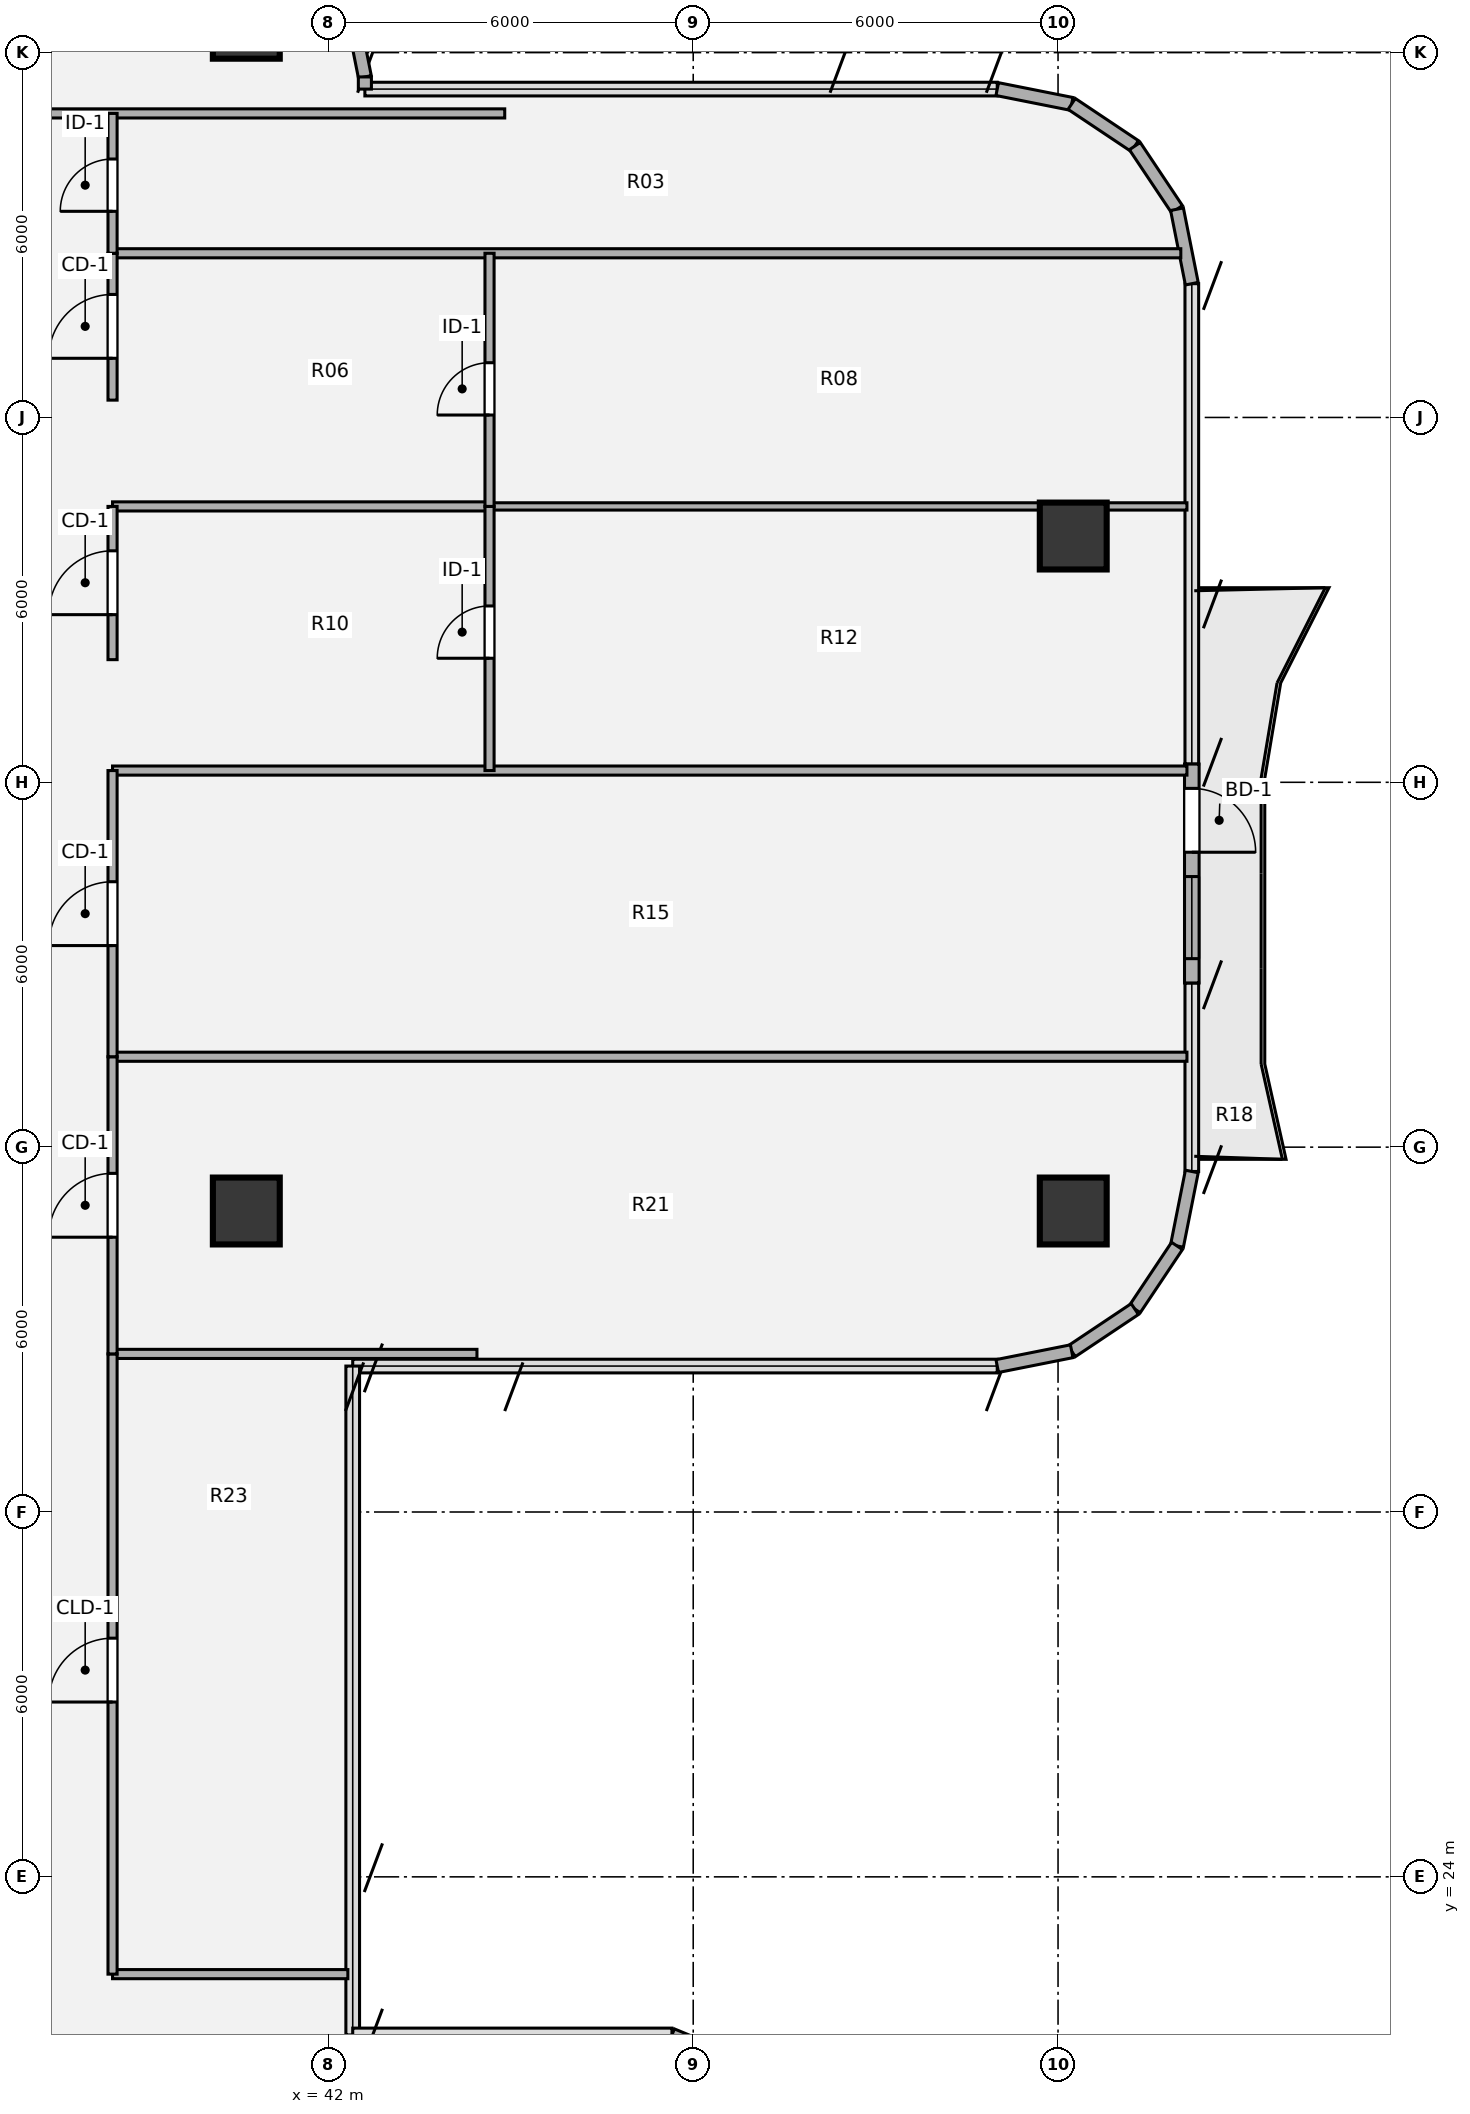
"""IFC4 building model, lengths in metres.
Left out: names, types, materials, properties, quantities, classifications, styles, units other than length and angle.
Written with IfcOpenShell. Run it as: python <this file> out.ifc"""

import sys

from ifc_helpers import new_model, si_unit, direction, frame, frame_2d, origin, origin_2d, place, context, subcontext, project, spatial, rectangle, hollow_circle, extrude, source, transform, mapped, element, fill, save


model = new_model("IFC4")
c1 = context("Model", 3, precision=1e-05, world=origin(), true_north=direction((0.0, 1.0)))
c2 = subcontext(c1, "Body", "Model", "MODEL_VIEW")
j1 = project(units=[si_unit("LENGTHUNIT", "METRE"), si_unit("PLANEANGLEUNIT", "RADIAN")], contexts=[c1])
p1 = place(None, origin())
s1 = spatial("IfcSite", under=j1, at=p1, CompositionType="ELEMENT")
p2 = place(p1, origin())
s2 = spatial("IfcBuilding", under=s1, at=p2, CompositionType="ELEMENT")
p3 = place(p2, frame((0.0, 0.0, 201.78)))
s3 = spatial("IfcBuildingStorey", under=s2, at=p3, CompositionType="ELEMENT", Elevation=201.78)
m1 = source(origin(), c2, "Body", "SweptSolid", [
    extrude(hollow_circle(Radius=0.55, WallThickness=0.04, at=origin_2d()), origin(), (0.0, 0.0, 1.0), 3.78),
])
for number, where, z_axis, x_axis in (
    (1, (54.25, 34.95, 0.0), (0.0, 0.0, 1.0), (1.0, 0.0, 0.0)),
    (2, (54.25, 46.05, 0.0), (0.0, 0.0, 1.0), (1.0, 0.0, 0.0)),
    (3, (40.65, 34.95, 0.0), (0.0, 0.0, 1.0), (1.0, 0.0, 0.0)),
    (4, (40.65, 54.45, 0.0), (0.0, 0.0, 1.0), (1.0, 0.0, 0.0)),
):
    element("IfcColumn", number, at=place(p3, frame(where, z_axis=z_axis, x_axis=x_axis)), inside=s3, PredefinedType="COLUMN", context=c2, shape_type="MappedRepresentation", body=[
        mapped(m1, transform((0.0, 0.0, 0.0), x_axis=(1.0, 0.0, 0.0), y_axis=(0.0, 1.0, 0.0), z_axis=(0.0, 0.0, 1.0), scale=1.0)),
    ])
p4 = place(p3, frame((42.387, 54.671, 0.0), z_axis=(0.0, 0.0, 1.0), x_axis=(0.195127417394, -0.980777900945, 0.0)))
e5 = element("IfcWall", 5, at=p4, inside=s3, PredefinedType="SOLIDWALL", context=c2, shape_type="SweptSolid", body=[
    extrude(rectangle(XDim=1.092, YDim=0.215, at=frame_2d((0.546, 0.0))), origin(), (0.0, 0.0, 1.0), 3.53),
])
p5 = place(p3, frame((42.6, 53.6, 0.0), z_axis=(0.0, 0.0, 1.0), x_axis=(0.0, -1.0, 0.0)))
e6 = element("IfcWall", 6, at=p5, inside=s3, PredefinedType="SOLIDWALL", context=c2, shape_type="SweptSolid", body=[
    extrude(rectangle(XDim=0.2, YDim=0.215, at=frame_2d((0.1, 0.0))), origin(), (0.0, 0.0, 1.0), 3.53),
])
for number, where, z_axis, x_axis in (
    (7, (53.0, 53.4, 0.0), (0.0, 0.0, 1.0), (0.981, -0.195, 0.0)),
    (8, (54.225, 53.156, 0.0), (0.0, 0.0, 1.0), (0.831, -0.556, 0.0)),
    (9, (55.263, 52.463, 0.0), (0.0, 0.0, 1.0), (0.556, -0.831, 0.0)),
    (10, (55.956, 51.425, 0.0), (0.0, 0.0, 1.0), (0.195, -0.981, 0.0)),
):
    element("IfcWall", number, at=place(p3, frame(where, z_axis=z_axis, x_axis=x_axis)), inside=s3, PredefinedType="SOLIDWALL", context=c2, shape_type="SweptSolid", body=[
        extrude(rectangle(XDim=1.249, YDim=0.215, at=frame_2d((0.624, 0.0))), origin(), (0.0, 0.0, 1.0), 3.53),
    ])
p6 = place(p3, frame((56.2, 42.3, 0.0), z_axis=(0.0, 0.0, 1.0), x_axis=(0.0, -1.0, 0.0)))
e11 = element("IfcWall", 11, at=p6, inside=s3, PredefinedType="SOLIDWALL", context=c2, shape_type="SweptSolid", body=[
    extrude(rectangle(XDim=3.6, YDim=0.24, at=frame_2d((1.8, 0.0))), origin(), (0.0, 0.0, 1.0), 3.53),
])
p7 = place(p6, frame((0.4, 0.0, 0.0)))
e12 = element("IfcOpeningElement", 12, at=p7, cuts=e11, PredefinedType="OPENING", context=c2, shape_type="SweptSolid", body=[
    extrude(rectangle(XDim=1.05, YDim=2.15, at=origin_2d()), frame((0.525, 0.13, 1.075), z_axis=(0.0, -1.0, 0.0), x_axis=(1.0, 0.0, 0.0)), (0.0, 0.0, 1.0), 0.26),
])
p8 = place(p6, frame((1.85, 0.0, 0.85)))
e13 = element("IfcOpeningElement", 13, at=p8, cuts=e11, PredefinedType="OPENING", context=c2, shape_type="SweptSolid", body=[
    extrude(rectangle(XDim=1.35, YDim=1.35, at=origin_2d()), frame((0.675, 0.13, 0.675), z_axis=(0.0, -1.0, 0.0), x_axis=(1.0, 0.0, 0.0)), (0.0, 0.0, 1.0), 0.26),
])
for number, where, z_axis, x_axis in (
    (14, (56.2, 35.6, 0.0), (0.0, 0.0, 1.0), (-0.195, -0.981, 0.0)),
    (15, (55.956, 34.375, 0.0), (0.0, 0.0, 1.0), (-0.556, -0.831, 0.0)),
    (16, (55.263, 33.337, 0.0), (0.0, 0.0, 1.0), (-0.831, -0.556, 0.0)),
    (17, (54.225, 32.644, 0.0), (0.0, 0.0, 1.0), (-0.981, -0.195, 0.0)),
):
    element("IfcWall", number, at=place(p3, frame(where, z_axis=z_axis, x_axis=x_axis)), inside=s3, PredefinedType="SOLIDWALL", context=c2, shape_type="SweptSolid", body=[
        extrude(rectangle(XDim=1.249, YDim=0.215, at=frame_2d((0.624, 0.0))), origin(), (0.0, 0.0, 1.0), 3.53),
    ])
p9 = place(p3, frame((47.65, 21.4, 0.0), z_axis=(0.0, 0.0, 1.0), x_axis=(0.924205486139, -0.381895560841, 0.0)))
e18 = element("IfcWall", 18, at=p9, inside=s3, PredefinedType="SOLIDWALL", context=c2, shape_type="SweptSolid", body=[
    extrude(rectangle(XDim=0.268, YDim=0.215, at=frame_2d((0.134, 0.0))), origin(), (0.0, 0.0, 1.0), 3.53),
])
p10 = place(p3, frame((38.45, 22.4, 0.0), z_axis=(0.0, 0.0, 1.0), x_axis=(1.0, 0.0, 0.0)))
e19 = element("IfcWall", 19, at=p10, inside=s3, PredefinedType="PARTITIONING", context=c2, shape_type="SweptSolid", body=[
    extrude(rectangle(XDim=3.87, YDim=0.15, at=frame_2d((1.935, 0.0))), origin(), (0.0, 0.0, 1.0), 3.5),
])
p11 = place(p3, frame((38.45, 32.6, 0.0), z_axis=(0.0, 0.0, 1.0), x_axis=(1.0, 0.0, 0.0)))
e20 = element("IfcWall", 20, at=p11, inside=s3, PredefinedType="PARTITIONING", context=c2, shape_type="SweptSolid", body=[
    extrude(rectangle(XDim=5.993, YDim=0.15, at=frame_2d((2.997, 0.0))), origin(), (0.0, 0.0, 1.0), 3.5),
])
p12 = place(p3, frame((38.45, 37.487, 0.0), z_axis=(0.0, 0.0, 1.0), x_axis=(1.0, 0.0, 0.0)))
e21 = element("IfcWall", 21, at=p12, inside=s3, PredefinedType="PARTITIONING", context=c2, shape_type="SweptSolid", body=[
    extrude(rectangle(XDim=17.67, YDim=0.15, at=frame_2d((8.835, 0.0))), origin(), (0.0, 0.0, 1.0), 3.055),
])
p13 = place(p3, frame((38.45, 42.193, 0.0), z_axis=(0.0, 0.0, 1.0), x_axis=(1.0, 0.0, 0.0)))
e22 = element("IfcWall", 22, at=p13, inside=s3, PredefinedType="PARTITIONING", context=c2, shape_type="SweptSolid", body=[
    extrude(rectangle(XDim=17.67, YDim=0.15, at=frame_2d((8.835, 0.0))), origin(), (0.0, 0.0, 1.0), 2.982),
])
p14 = place(p3, frame((38.45, 46.537, 0.0), z_axis=(0.0, 0.0, 1.0), x_axis=(1.0, 0.0, 0.0)))
e23 = element("IfcWall", 23, at=p14, inside=s3, PredefinedType="PARTITIONING", context=c2, shape_type="SweptSolid", body=[
    extrude(rectangle(XDim=6.2, YDim=0.15, at=frame_2d((3.1, 0.0))), origin(), (0.0, 0.0, 1.0), 3.259),
])
p15 = place(p3, frame((44.65, 46.537, 0.0), z_axis=(0.0, 0.0, 1.0), x_axis=(1.0, 0.0, 0.0)))
e24 = element("IfcWall", 24, at=p15, inside=s3, PredefinedType="PARTITIONING", context=c2, shape_type="SweptSolid", body=[
    extrude(rectangle(XDim=11.47, YDim=0.12, at=frame_2d((5.735, 0.0))), origin(), (0.0, 0.0, 1.0), 3.5),
])
p16 = place(p3, frame((38.45, 50.7, 0.0), z_axis=(0.0, 0.0, 1.0), x_axis=(1.0, 0.0, 0.0)))
e25 = element("IfcWall", 25, at=p16, inside=s3, PredefinedType="PARTITIONING", context=c2, shape_type="SweptSolid", body=[
    extrude(rectangle(XDim=17.569, YDim=0.15, at=frame_2d((8.785, 0.0))), origin(), (0.0, 0.0, 1.0), 3.308),
])
p17 = place(p3, frame((27.1, 53.0, 0.0), z_axis=(0.0, 0.0, 1.0), x_axis=(1.0, 0.0, 0.0)))
e26 = element("IfcWall", 26, at=p17, inside=s3, PredefinedType="PARTITIONING", context=c2, shape_type="SweptSolid", body=[
    extrude(rectangle(XDim=17.8, YDim=0.15, at=frame_2d((8.9, 0.0))), origin(), (0.0, 0.0, 1.0), 3.308),
])
p18 = place(p17, frame((8.375, 0.0, 0.0)))
e27 = element("IfcOpeningElement", 27, at=p18, cuts=e26, PredefinedType="OPENING", context=c2, shape_type="SweptSolid", body=[
    extrude(rectangle(XDim=1.05, YDim=2.1, at=origin_2d()), frame((0.525, 0.085, 1.05), z_axis=(0.0, -1.0, 0.0), x_axis=(1.0, 0.0, 0.0)), (0.0, 0.0, 1.0), 0.17),
])
p19 = place(p3, frame((38.45, 22.4, 0.0), z_axis=(0.0, 0.0, 1.0), x_axis=(0.0, 1.0, 0.0)))
e28 = element("IfcWall", 28, at=p19, inside=s3, PredefinedType="PARTITIONING", context=c2, shape_type="SweptSolid", body=[
    extrude(rectangle(XDim=10.2, YDim=0.15, at=frame_2d((5.1, 0.0))), origin(), (0.0, 0.0, 1.0), 3.5),
])
p20 = place(p19, frame((4.475, 0.0, 0.0)))
e29 = element("IfcOpeningElement", 29, at=p20, cuts=e28, PredefinedType="OPENING", context=c2, shape_type="SweptSolid", body=[
    extrude(rectangle(XDim=1.05, YDim=2.1, at=origin_2d()), frame((0.525, 0.085, 1.05), z_axis=(0.0, -1.0, 0.0), x_axis=(1.0, 0.0, 0.0)), (0.0, 0.0, 1.0), 0.17),
])
p21 = place(p3, frame((38.45, 32.6, 0.0), z_axis=(0.0, 0.0, 1.0), x_axis=(0.0, 1.0, 0.0)))
e30 = element("IfcWall", 30, at=p21, inside=s3, PredefinedType="PARTITIONING", context=c2, shape_type="SweptSolid", body=[
    extrude(rectangle(XDim=4.887, YDim=0.15, at=frame_2d((2.443, 0.0))), origin(), (0.0, 0.0, 1.0), 3.5),
])
p22 = place(p21, frame((1.919, 0.0, 0.0)))
e31 = element("IfcOpeningElement", 31, at=p22, cuts=e30, PredefinedType="OPENING", context=c2, shape_type="SweptSolid", body=[
    extrude(rectangle(XDim=1.05, YDim=2.1, at=origin_2d()), frame((0.525, 0.085, 1.05), z_axis=(0.0, -1.0, 0.0), x_axis=(1.0, 0.0, 0.0)), (0.0, 0.0, 1.0), 0.17),
])
p23 = place(p3, frame((38.45, 37.487, 0.0), z_axis=(0.0, 0.0, 1.0), x_axis=(0.0, 1.0, 0.0)))
e32 = element("IfcWall", 32, at=p23, inside=s3, PredefinedType="PARTITIONING", context=c2, shape_type="SweptSolid", body=[
    extrude(rectangle(XDim=4.706, YDim=0.15, at=frame_2d((2.353, 0.0))), origin(), (0.0, 0.0, 1.0), 3.5),
])
p24 = place(p23, frame((1.828, 0.0, 0.0)))
e33 = element("IfcOpeningElement", 33, at=p24, cuts=e32, PredefinedType="OPENING", context=c2, shape_type="SweptSolid", body=[
    extrude(rectangle(XDim=1.05, YDim=2.1, at=origin_2d()), frame((0.525, 0.085, 1.05), z_axis=(0.0, -1.0, 0.0), x_axis=(1.0, 0.0, 0.0)), (0.0, 0.0, 1.0), 0.17),
])
p25 = place(p3, frame((38.45, 44.017, 0.0), z_axis=(0.0, 0.0, 1.0), x_axis=(0.0, 1.0, 0.0)))
e34 = element("IfcWall", 34, at=p25, inside=s3, PredefinedType="PARTITIONING", context=c2, shape_type="SweptSolid", body=[
    extrude(rectangle(XDim=2.52, YDim=0.15, at=frame_2d((1.26, 0.0))), origin(), (0.0, 0.0, 1.0), 3.5),
])
p26 = place(p25, frame((0.74, 0.0, 0.0)))
e35 = element("IfcOpeningElement", 35, at=p26, cuts=e34, PredefinedType="OPENING", context=c2, shape_type="SweptSolid", body=[
    extrude(rectangle(XDim=1.05, YDim=2.1, at=origin_2d()), frame((0.525, 0.085, 1.05), z_axis=(0.0, -1.0, 0.0), x_axis=(1.0, 0.0, 0.0)), (0.0, 0.0, 1.0), 0.17),
])
p27 = place(p3, frame((38.45, 48.285, 0.0), z_axis=(0.0, 0.0, 1.0), x_axis=(0.0, 1.0, 0.0)))
e36 = element("IfcWall", 36, at=p27, inside=s3, PredefinedType="PARTITIONING", context=c2, shape_type="SweptSolid", body=[
    extrude(rectangle(XDim=2.415, YDim=0.15, at=frame_2d((1.208, 0.0))), origin(), (0.0, 0.0, 1.0), 3.5),
])
p28 = place(p27, frame((0.688, 0.0, 0.0)))
e37 = element("IfcOpeningElement", 37, at=p28, cuts=e36, PredefinedType="OPENING", context=c2, shape_type="SweptSolid", body=[
    extrude(rectangle(XDim=1.05, YDim=2.1, at=origin_2d()), frame((0.525, 0.085, 1.05), z_axis=(0.0, -1.0, 0.0), x_axis=(1.0, 0.0, 0.0)), (0.0, 0.0, 1.0), 0.17),
])
p29 = place(p3, frame((38.45, 50.7, 0.0), z_axis=(0.0, 0.0, 1.0), x_axis=(0.0, 1.0, 0.0)))
e38 = element("IfcWall", 38, at=p29, inside=s3, PredefinedType="PARTITIONING", context=c2, shape_type="SweptSolid", body=[
    extrude(rectangle(XDim=2.3, YDim=0.15, at=frame_2d((1.15, 0.0))), origin(), (0.0, 0.0, 1.0), 3.5),
])
p30 = place(p29, frame((0.69, 0.0, 0.0)))
e39 = element("IfcOpeningElement", 39, at=p30, cuts=e38, PredefinedType="OPENING", context=c2, shape_type="SweptSolid", body=[
    extrude(rectangle(XDim=0.86, YDim=2.1, at=origin_2d()), frame((0.43, 0.085, 1.05), z_axis=(0.0, -1.0, 0.0), x_axis=(1.0, 0.0, 0.0)), (0.0, 0.0, 1.0), 0.17),
])
p31 = place(p3, frame((44.65, 42.193, 0.0), z_axis=(0.0, 0.0, 1.0), x_axis=(0.0, 1.0, 0.0)))
e40 = element("IfcWall", 40, at=p31, inside=s3, PredefinedType="PARTITIONING", context=c2, shape_type="SweptSolid", body=[
    extrude(rectangle(XDim=4.344, YDim=0.15, at=frame_2d((2.172, 0.0))), origin(), (0.0, 0.0, 1.0), 3.5),
])
p32 = place(p31, frame((1.847, 0.0, 0.0)))
e41 = element("IfcOpeningElement", 41, at=p32, cuts=e40, PredefinedType="OPENING", context=c2, shape_type="SweptSolid", body=[
    extrude(rectangle(XDim=0.86, YDim=2.1, at=origin_2d()), frame((0.43, 0.085, 1.05), z_axis=(0.0, -1.0, 0.0), x_axis=(1.0, 0.0, 0.0)), (0.0, 0.0, 1.0), 0.17),
])
p33 = place(p3, frame((44.65, 46.537, 0.0), z_axis=(0.0, 0.0, 1.0), x_axis=(0.0, 1.0, 0.0)))
e42 = element("IfcWall", 42, at=p33, inside=s3, PredefinedType="PARTITIONING", context=c2, shape_type="SweptSolid", body=[
    extrude(rectangle(XDim=4.163, YDim=0.15, at=frame_2d((2.082, 0.0))), origin(), (0.0, 0.0, 1.0), 3.5),
])
p34 = place(p33, frame((1.503, 0.0, 0.0)))
e43 = element("IfcOpeningElement", 43, at=p34, cuts=e42, PredefinedType="OPENING", context=c2, shape_type="SweptSolid", body=[
    extrude(rectangle(XDim=0.86, YDim=2.1, at=origin_2d()), frame((0.43, 0.085, 1.05), z_axis=(0.0, -1.0, 0.0), x_axis=(1.0, 0.0, 0.0)), (0.0, 0.0, 1.0), 0.17),
])
m2 = source(origin(), c2, "Body", "SweptSolid", [
    extrude(rectangle(XDim=1.05, YDim=2.15, at=origin_2d()), frame((0.525, 0.025, 1.075), z_axis=(0.0, -1.0, 0.0), x_axis=(1.0, 0.0, 0.0)), (0.0, 0.0, 1.0), 0.05),
])
p35 = place(p7, origin())
e44 = element("IfcDoor", 44, at=p35, inside=s3, OperationType="SINGLE_SWING_RIGHT", PredefinedType="DOOR", context=c2, shape_type="MappedRepresentation", body=[
    mapped(m2, transform((0.0, 0.0, 0.0), x_axis=(1.0, 0.0, 0.0), y_axis=(0.0, 1.0, 0.0), z_axis=(0.0, 0.0, 1.0), scale=1.0)),
])
fill(e12, e44)
m3 = source(origin(), c2, "Body", "SweptSolid", [
    extrude(rectangle(XDim=1.35, YDim=1.35, at=origin_2d()), frame((0.675, 0.03, 0.675), z_axis=(0.0, -1.0, 0.0), x_axis=(1.0, 0.0, 0.0)), (0.0, 0.0, 1.0), 0.06),
])
p36 = place(p8, origin())
e45 = element("IfcWindow", 45, at=p36, inside=s3, PartitioningType="SINGLE_PANEL", PredefinedType="WINDOW", context=c2, shape_type="MappedRepresentation", body=[
    mapped(m3, transform((0.0, 0.0, 0.0), x_axis=(1.0, 0.0, 0.0), y_axis=(0.0, 1.0, 0.0), z_axis=(0.0, 0.0, 1.0), scale=1.0)),
])
fill(e13, e45)
m4 = source(origin(), c2, "Body", "SweptSolid", [
    extrude(rectangle(XDim=1.05, YDim=2.1, at=origin_2d()), frame((0.525, 0.025, 1.05), z_axis=(0.0, -1.0, 0.0), x_axis=(1.0, 0.0, 0.0)), (0.0, 0.0, 1.0), 0.05),
])
p37 = place(p20, origin())
e46 = element("IfcDoor", 46, at=p37, inside=s3, OperationType="SINGLE_SWING_LEFT", PredefinedType="DOOR", context=c2, shape_type="MappedRepresentation", body=[
    mapped(m4, transform((0.0, 0.0, 0.0), x_axis=(1.0, 0.0, 0.0), y_axis=(0.0, 1.0, 0.0), z_axis=(0.0, 0.0, 1.0), scale=1.0)),
])
fill(e29, e46)
m5 = source(origin(), c2, "Body", "SweptSolid", [
    extrude(rectangle(XDim=1.05, YDim=2.1, at=origin_2d()), frame((0.525, 0.025, 1.05), z_axis=(0.0, -1.0, 0.0), x_axis=(1.0, 0.0, 0.0)), (0.0, 0.0, 1.0), 0.05),
])
p38 = place(p22, origin())
e47 = element("IfcDoor", 47, at=p38, inside=s3, OperationType="SINGLE_SWING_LEFT", PredefinedType="DOOR", context=c2, shape_type="MappedRepresentation", body=[
    mapped(m5, transform((0.0, 0.0, 0.0), x_axis=(1.0, 0.0, 0.0), y_axis=(0.0, 1.0, 0.0), z_axis=(0.0, 0.0, 1.0), scale=1.0)),
])
fill(e31, e47)
p39 = place(p24, origin())
e48 = element("IfcDoor", 48, at=p39, inside=s3, OperationType="SINGLE_SWING_LEFT", PredefinedType="DOOR", context=c2, shape_type="MappedRepresentation", body=[
    mapped(m5, transform((0.0, 0.0, 0.0), x_axis=(1.0, 0.0, 0.0), y_axis=(0.0, 1.0, 0.0), z_axis=(0.0, 0.0, 1.0), scale=1.0)),
])
fill(e33, e48)
p40 = place(p26, origin())
e49 = element("IfcDoor", 49, at=p40, inside=s3, OperationType="SINGLE_SWING_LEFT", PredefinedType="DOOR", context=c2, shape_type="MappedRepresentation", body=[
    mapped(m5, transform((0.0, 0.0, 0.0), x_axis=(1.0, 0.0, 0.0), y_axis=(0.0, 1.0, 0.0), z_axis=(0.0, 0.0, 1.0), scale=1.0)),
])
fill(e35, e49)
p41 = place(p28, origin())
e50 = element("IfcDoor", 50, at=p41, inside=s3, OperationType="SINGLE_SWING_LEFT", PredefinedType="DOOR", context=c2, shape_type="MappedRepresentation", body=[
    mapped(m5, transform((0.0, 0.0, 0.0), x_axis=(1.0, 0.0, 0.0), y_axis=(0.0, 1.0, 0.0), z_axis=(0.0, 0.0, 1.0), scale=1.0)),
])
fill(e37, e50)
m6 = source(origin(), c2, "Body", "SweptSolid", [
    extrude(rectangle(XDim=0.86, YDim=2.1, at=origin_2d()), frame((0.43, 0.025, 1.05), z_axis=(0.0, -1.0, 0.0), x_axis=(1.0, 0.0, 0.0)), (0.0, 0.0, 1.0), 0.05),
])
p42 = place(p30, origin())
e51 = element("IfcDoor", 51, at=p42, inside=s3, OperationType="SINGLE_SWING_LEFT", PredefinedType="DOOR", context=c2, shape_type="MappedRepresentation", body=[
    mapped(m6, transform((0.0, 0.0, 0.0), x_axis=(1.0, 0.0, 0.0), y_axis=(0.0, 1.0, 0.0), z_axis=(0.0, 0.0, 1.0), scale=1.0)),
])
fill(e39, e51)
p43 = place(p32, origin())
e52 = element("IfcDoor", 52, at=p43, inside=s3, OperationType="SINGLE_SWING_LEFT", PredefinedType="DOOR", context=c2, shape_type="MappedRepresentation", body=[
    mapped(m6, transform((0.0, 0.0, 0.0), x_axis=(1.0, 0.0, 0.0), y_axis=(0.0, 1.0, 0.0), z_axis=(0.0, 0.0, 1.0), scale=1.0)),
])
fill(e41, e52)
p44 = place(p34, origin())
e53 = element("IfcDoor", 53, at=p44, inside=s3, OperationType="SINGLE_SWING_LEFT", PredefinedType="DOOR", context=c2, shape_type="MappedRepresentation", body=[
    mapped(m6, transform((0.0, 0.0, 0.0), x_axis=(1.0, 0.0, 0.0), y_axis=(0.0, 1.0, 0.0), z_axis=(0.0, 0.0, 1.0), scale=1.0)),
])
fill(e43, e53)
save(model, sys.argv[1])
